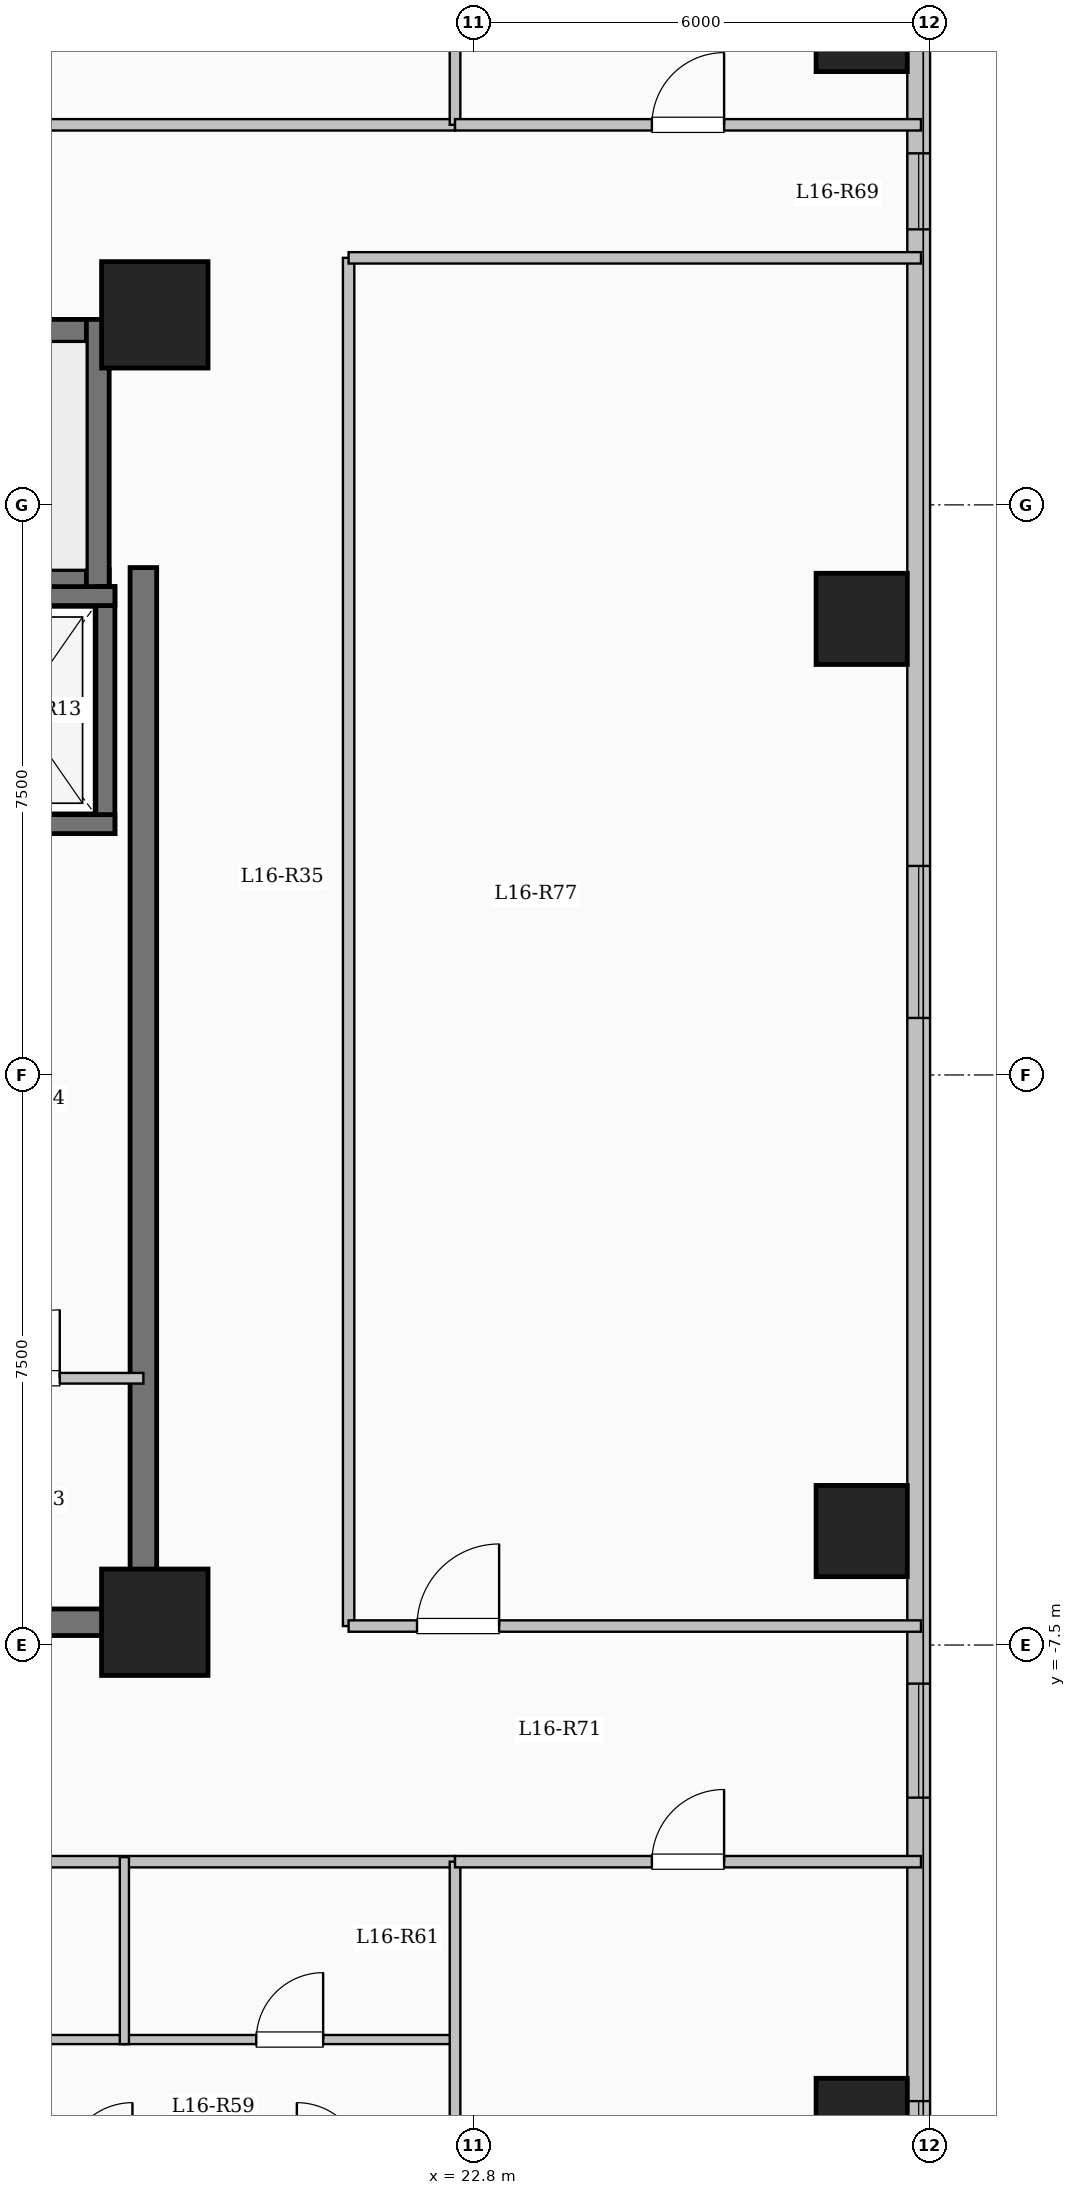
"""IFC4 building model, lengths in metres.
Left out: names, types, materials, properties, quantities, classifications, styles, units other than length and angle.
Written with IfcOpenShell. Run it as: python <this file> out.ifc"""

import sys

from ifc_helpers import new_model, si_unit, direction, frame, frame_2d, origin, origin_2d, place, context, subcontext, project, spatial, rectangle, extrude, element, fill, save


model = new_model("IFC4")
c1 = context("Model", 3, precision=1e-05, world=origin(), true_north=direction((0.0, 1.0)))
c2 = subcontext(c1, "Body", "Model", "MODEL_VIEW")
j1 = project(units=[si_unit("LENGTHUNIT", "METRE"), si_unit("PLANEANGLEUNIT", "RADIAN")], contexts=[c1])
p1 = place(None, origin())
s1 = spatial("IfcSite", under=j1, at=p1, CompositionType="ELEMENT")
p2 = place(p1, origin())
s2 = spatial("IfcBuilding", under=s1, at=p2, CompositionType="ELEMENT")
p3 = place(p2, frame((0.0, 0.0, 60.85)))
s3 = spatial("IfcBuildingStorey", under=s2, at=p3, CompositionType="ELEMENT", Elevation=60.85)
for number, where, z_axis, x_axis in (
    (1, (18.6, -7.2, 0.0), (0.0, 0.0, 1.0), (1.0, 0.0, 0.0)),
    (2, (18.6, 10.0, 0.0), (0.0, 0.0, 1.0), (1.0, 0.0, 0.0)),
):
    element("IfcColumn", number, at=place(p3, frame(where, z_axis=z_axis, x_axis=x_axis)), inside=s3, PredefinedType="COLUMN", context=c2, shape_type="SweptSolid", body=[
        extrude(rectangle(XDim=1.4, YDim=1.4, at=origin_2d()), origin(), (0.0, 0.0, 1.0), 3.35),
    ])
for number, where, z_axis, x_axis in (
    (3, (27.9, -13.8, 0.0), (0.0, 0.0, 1.0), (1.0, 0.0, 0.0)),
    (4, (27.9, -6.0, 0.0), (0.0, 0.0, 1.0), (1.0, 0.0, 0.0)),
    (5, (27.9, 6.0, 0.0), (0.0, 0.0, 1.0), (1.0, 0.0, 0.0)),
    (6, (27.9, 13.8, 0.0), (0.0, 0.0, 1.0), (1.0, 0.0, 0.0)),
):
    element("IfcColumn", number, at=place(p3, frame(where, z_axis=z_axis, x_axis=x_axis)), inside=s3, PredefinedType="COLUMN", context=c2, shape_type="SweptSolid", body=[
        extrude(rectangle(XDim=1.2, YDim=1.2, at=origin_2d()), origin(), (0.0, 0.0, 1.0), 3.35),
    ])
p4 = place(p3, frame((28.65, 19.05, 0.0), z_axis=(0.0, 0.0, 1.0), x_axis=(0.0, -1.0, 0.0)))
e7 = element("IfcWall", 7, at=p4, inside=s3, PredefinedType="SOLIDWALL", context=c2, shape_type="SweptSolid", body=[
    extrude(rectangle(XDim=38.1, YDim=0.3, at=frame_2d((19.05, 0.0))), origin(), (0.0, 0.0, 1.0), 3.05),
])
p5 = place(p4, frame((2.275, 0.0, 0.9)))
e8 = element("IfcOpeningElement", 8, at=p5, cuts=e7, PredefinedType="OPENING", context=c2, shape_type="SweptSolid", body=[
    extrude(rectangle(XDim=2.0, YDim=1.7, at=frame_2d((1.0, 0.85))), frame((0.0, 0.16, 0.0), z_axis=(0.0, -1.0, 0.0), x_axis=(1.0, 0.0, 0.0)), (0.0, 0.0, 1.0), 0.32),
])
p6 = place(p4, frame((6.925, 0.0, 0.95)))
e9 = element("IfcOpeningElement", 9, at=p6, cuts=e7, PredefinedType="OPENING", context=c2, shape_type="SweptSolid", body=[
    extrude(rectangle(XDim=1.0, YDim=1.5, at=frame_2d((0.5, 0.75))), frame((0.0, 0.16, 0.0), z_axis=(0.0, -1.0, 0.0), x_axis=(1.0, 0.0, 0.0)), (0.0, 0.0, 1.0), 0.32),
])
p7 = place(p4, frame((16.3, 0.0, 0.9)))
e10 = element("IfcOpeningElement", 10, at=p7, cuts=e7, PredefinedType="OPENING", context=c2, shape_type="SweptSolid", body=[
    extrude(rectangle(XDim=2.0, YDim=1.7, at=frame_2d((1.0, 0.85))), frame((0.0, 0.16, 0.0), z_axis=(0.0, -1.0, 0.0), x_axis=(1.0, 0.0, 0.0)), (0.0, 0.0, 1.0), 0.32),
])
p8 = place(p4, frame((27.058, 0.0, 0.9)))
e11 = element("IfcOpeningElement", 11, at=p8, cuts=e7, PredefinedType="OPENING", context=c2, shape_type="SweptSolid", body=[
    extrude(rectangle(XDim=1.5, YDim=1.65, at=frame_2d((0.75, 0.825))), frame((0.0, 0.16, 0.0), z_axis=(0.0, -1.0, 0.0), x_axis=(1.0, 0.0, 0.0)), (0.0, 0.0, 1.0), 0.32),
])
p9 = place(p4, frame((32.55, 0.0, 0.9)))
e12 = element("IfcOpeningElement", 12, at=p9, cuts=e7, PredefinedType="OPENING", context=c2, shape_type="SweptSolid", body=[
    extrude(rectangle(XDim=2.4, YDim=1.8, at=frame_2d((1.2, 0.9))), frame((0.0, 0.16, 0.0), z_axis=(0.0, -1.0, 0.0), x_axis=(1.0, 0.0, 0.0)), (0.0, 0.0, 1.0), 0.32),
])
p10 = place(p3, frame((10.0, 9.79, 0.0), z_axis=(0.0, 0.0, 1.0), x_axis=(1.0, 0.0, 0.0)))
e13 = element("IfcWall", 13, at=p10, inside=s3, PredefinedType="SHEAR", context=c2, shape_type="SweptSolid", body=[
    extrude(rectangle(XDim=8.0, YDim=0.3, at=frame_2d((4.0, 0.0))), origin(), (0.0, 0.0, 1.0), 3.35),
])
p11 = place(p3, frame((10.0, 6.5, 0.0), z_axis=(0.0, 0.0, 1.0), x_axis=(1.0, 0.0, 0.0)))
e14 = element("IfcWall", 14, at=p11, inside=s3, PredefinedType="SHEAR", context=c2, shape_type="SweptSolid", body=[
    extrude(rectangle(XDim=8.0, YDim=0.3, at=frame_2d((4.0, 0.0))), origin(), (0.0, 0.0, 1.0), 3.35),
])
p12 = place(p11, frame((0.55, 0.0, 0.0)))
e15 = element("IfcOpeningElement", 15, at=p12, cuts=e14, PredefinedType="OPENING", context=c2, shape_type="SweptSolid", body=[
    extrude(rectangle(XDim=1.0, YDim=2.15, at=frame_2d((0.5, 1.075))), frame((0.0, 0.16, 0.0), z_axis=(0.0, -1.0, 0.0), x_axis=(1.0, 0.0, 0.0)), (0.0, 0.0, 1.0), 0.32),
])
p13 = place(p3, frame((17.85, 6.35, 0.0), z_axis=(0.0, 0.0, 1.0), x_axis=(0.0, 1.0, 0.0)))
e16 = element("IfcWall", 16, at=p13, inside=s3, PredefinedType="SHEAR", context=c2, shape_type="SweptSolid", body=[
    extrude(rectangle(XDim=3.59, YDim=0.3, at=frame_2d((1.795, 0.0))), origin(), (0.0, 0.0, 1.0), 3.35),
])
p14 = place(p3, frame((17.95, 3.175, 0.0), z_axis=(0.0, 0.0, 1.0), x_axis=(0.0, 1.0, 0.0)))
e17 = element("IfcWall", 17, at=p14, inside=s3, PredefinedType="SHEAR", context=c2, shape_type="SweptSolid", body=[
    extrude(rectangle(XDim=3.25, YDim=0.25, at=frame_2d((1.625, 0.0))), origin(), (0.0, 0.0, 1.0), 3.35),
])
for number, where, z_axis, x_axis in (
    (18, (15.525, 3.3, 0.0), (0.0, 0.0, 1.0), (1.0, 0.0, 0.0)),
    (19, (15.525, 6.3, 0.0), (0.0, 0.0, 1.0), (1.0, 0.0, 0.0)),
):
    element("IfcWall", number, at=place(p3, frame(where, z_axis=z_axis, x_axis=x_axis)), inside=s3, PredefinedType="SHEAR", context=c2, shape_type="SweptSolid", body=[
        extrude(rectangle(XDim=2.55, YDim=0.25, at=frame_2d((1.275, 0.0))), origin(), (0.0, 0.0, 1.0), 3.35),
    ])
p15 = place(p3, frame((18.45, -7.375, 0.0), z_axis=(0.0, 0.0, 1.0), x_axis=(0.0, 1.0, 0.0)))
e20 = element("IfcWall", 20, at=p15, inside=s3, PredefinedType="SHEAR", context=c2, shape_type="SweptSolid", body=[
    extrude(rectangle(XDim=14.05, YDim=0.35, at=frame_2d((7.025, 0.0))), origin(), (0.0, 0.0, 1.0), 3.35),
])
p16 = place(p3, frame((10.075, -7.2, 0.0), z_axis=(0.0, 0.0, 1.0), x_axis=(1.0, 0.0, 0.0)))
e21 = element("IfcWall", 21, at=p16, inside=s3, PredefinedType="SHEAR", context=c2, shape_type="SweptSolid", body=[
    extrude(rectangle(XDim=8.55, YDim=0.35, at=frame_2d((4.275, 0.0))), origin(), (0.0, 0.0, 1.0), 3.35),
])
p17 = place(p3, frame((15.4, -3.99, 0.0), z_axis=(0.0, 0.0, 1.0), x_axis=(1.0, 0.0, 0.0)))
e22 = element("IfcWall", 22, at=p17, inside=s3, PredefinedType="PARTITIONING", context=c2, shape_type="SweptSolid", body=[
    extrude(rectangle(XDim=3.05, YDim=0.14, at=frame_2d((1.525, 0.0))), origin(), (0.0, 0.0, 1.0), 3.05),
])
p18 = place(p17, frame((1.05, 0.0, 0.0)))
e23 = element("IfcOpeningElement", 23, at=p18, cuts=e22, PredefinedType="OPENING", context=c2, shape_type="SweptSolid", body=[
    extrude(rectangle(XDim=0.9, YDim=2.08, at=frame_2d((0.45, 1.04))), frame((0.0, 0.08, 0.0), z_axis=(0.0, -1.0, 0.0), x_axis=(1.0, 0.0, 0.0)), (0.0, 0.0, 1.0), 0.16),
])
p19 = place(p3, frame((3.85, 12.5, 0.0), z_axis=(0.0, 0.0, 1.0), x_axis=(1.0, 0.0, 0.0)))
e24 = element("IfcWall", 24, at=p19, inside=s3, PredefinedType="PARTITIONING", context=c2, shape_type="SweptSolid", body=[
    extrude(rectangle(XDim=18.7, YDim=0.15, at=frame_2d((9.35, 0.0))), origin(), (0.0, 0.0, 1.0), 3.05),
])
p20 = place(p19, frame((0.7, 0.0, 0.0)))
e25 = element("IfcOpeningElement", 25, at=p20, cuts=e24, PredefinedType="OPENING", context=c2, shape_type="SweptSolid", body=[
    extrude(rectangle(XDim=0.96, YDim=2.15, at=frame_2d((0.48, 1.075))), frame((0.0, 0.085, 0.0), z_axis=(0.0, -1.0, 0.0), x_axis=(1.0, 0.0, 0.0)), (0.0, 0.0, 1.0), 0.17),
])
p21 = place(p3, frame((21.15, -7.25, 0.0), z_axis=(0.0, 0.0, 1.0), x_axis=(0.0, 1.0, 0.0)))
e26 = element("IfcWall", 26, at=p21, inside=s3, PredefinedType="PARTITIONING", context=c2, shape_type="SweptSolid", body=[
    extrude(rectangle(XDim=18.0, YDim=0.15, at=frame_2d((9.0, 0.0))), origin(), (0.0, 0.0, 1.0), 2.535),
])
p22 = place(p3, frame((8.55, -10.35, 0.0), z_axis=(0.0, 0.0, 1.0), x_axis=(1.0, 0.0, 0.0)))
e27 = element("IfcWall", 27, at=p22, inside=s3, PredefinedType="PARTITIONING", context=c2, shape_type="SweptSolid", body=[
    extrude(rectangle(XDim=14.0, YDim=0.15, at=frame_2d((7.0, 0.0))), origin(), (0.0, 0.0, 1.0), 3.05),
])
p23 = place(p22, frame((0.75, 0.0, 0.0)))
e28 = element("IfcOpeningElement", 28, at=p23, cuts=e27, PredefinedType="OPENING", context=c2, shape_type="SweptSolid", body=[
    extrude(rectangle(XDim=0.96, YDim=2.15, at=frame_2d((0.48, 1.075))), frame((0.0, 0.085, 0.0), z_axis=(0.0, -1.0, 0.0), x_axis=(1.0, 0.0, 0.0)), (0.0, 0.0, 1.0), 0.17),
])
p24 = place(p3, frame((13.362, -12.69, 0.0), z_axis=(0.0, 0.0, 1.0), x_axis=(1.0, 0.0, 0.0)))
e29 = element("IfcWall", 29, at=p24, inside=s3, PredefinedType="PARTITIONING", context=c2, shape_type="SweptSolid", body=[
    extrude(rectangle(XDim=4.838, YDim=0.12, at=frame_2d((2.419, 0.0))), origin(), (0.0, 0.0, 1.0), 2.535),
])
p25 = place(p24, frame((1.979, 0.0, 0.0)))
e30 = element("IfcOpeningElement", 30, at=p25, cuts=e29, PredefinedType="OPENING", context=c2, shape_type="SweptSolid", body=[
    extrude(rectangle(XDim=0.88, YDim=2.1, at=frame_2d((0.44, 1.05))), frame((0.0, 0.07, 0.0), z_axis=(0.0, -1.0, 0.0), x_axis=(1.0, 0.0, 0.0)), (0.0, 0.0, 1.0), 0.14),
])
p26 = place(p3, frame((18.2, -12.69, 0.0), z_axis=(0.0, 0.0, 1.0), x_axis=(1.0, 0.0, 0.0)))
e31 = element("IfcWall", 31, at=p26, inside=s3, PredefinedType="PARTITIONING", context=c2, shape_type="SweptSolid", body=[
    extrude(rectangle(XDim=4.35, YDim=0.12, at=frame_2d((2.175, 0.0))), origin(), (0.0, 0.0, 1.0), 3.05),
])
p27 = place(p26, frame((1.735, 0.0, 0.0)))
e32 = element("IfcOpeningElement", 32, at=p27, cuts=e31, PredefinedType="OPENING", context=c2, shape_type="SweptSolid", body=[
    extrude(rectangle(XDim=0.88, YDim=2.1, at=frame_2d((0.44, 1.05))), frame((0.0, 0.07, 0.0), z_axis=(0.0, -1.0, 0.0), x_axis=(1.0, 0.0, 0.0)), (0.0, 0.0, 1.0), 0.14),
])
p28 = place(p3, frame((18.2, -12.75, 0.0), z_axis=(0.0, 0.0, 1.0), x_axis=(0.0, 1.0, 0.0)))
e33 = element("IfcWall", 33, at=p28, inside=s3, PredefinedType="PARTITIONING", context=c2, shape_type="SweptSolid", body=[
    extrude(rectangle(XDim=2.46, YDim=0.12, at=frame_2d((1.23, 0.0))), origin(), (0.0, 0.0, 1.0), 3.05),
])
p29 = place(p3, frame((21.15, -7.25, 0.0), z_axis=(0.0, 0.0, 1.0), x_axis=(1.0, 0.0, 0.0)))
e34 = element("IfcWall", 34, at=p29, inside=s3, PredefinedType="PARTITIONING", context=c2, shape_type="SweptSolid", body=[
    extrude(rectangle(XDim=7.53, YDim=0.15, at=frame_2d((3.765, 0.0))), origin(), (0.0, 0.0, 1.0), 3.05),
])
p30 = place(p29, frame((0.9, 0.0, 0.0)))
e35 = element("IfcOpeningElement", 35, at=p30, cuts=e34, PredefinedType="OPENING", context=c2, shape_type="SweptSolid", body=[
    extrude(rectangle(XDim=1.08, YDim=2.15, at=frame_2d((0.54, 1.075))), frame((0.0, 0.085, 0.0), z_axis=(0.0, -1.0, 0.0), x_axis=(1.0, 0.0, 0.0)), (0.0, 0.0, 1.0), 0.17),
])
p31 = place(p3, frame((21.15, 10.75, 0.0), z_axis=(0.0, 0.0, 1.0), x_axis=(1.0, 0.0, 0.0)))
e36 = element("IfcWall", 36, at=p31, inside=s3, PredefinedType="PARTITIONING", context=c2, shape_type="SweptSolid", body=[
    extrude(rectangle(XDim=7.53, YDim=0.15, at=frame_2d((3.765, 0.0))), origin(), (0.0, 0.0, 1.0), 3.05),
])
p32 = place(p3, frame((22.55, -19.05, 0.0), z_axis=(0.0, 0.0, 1.0), x_axis=(0.0, 1.0, 0.0)))
e37 = element("IfcWall", 37, at=p32, inside=s3, PredefinedType="PARTITIONING", context=c2, shape_type="SweptSolid", body=[
    extrude(rectangle(XDim=8.7, YDim=0.14, at=frame_2d((4.35, 0.0))), origin(), (0.0, 0.0, 1.0), 3.05),
])
p33 = place(p3, frame((22.55, 12.5, 0.0), z_axis=(0.0, 0.0, 1.0), x_axis=(0.0, 1.0, 0.0)))
e38 = element("IfcWall", 38, at=p33, inside=s3, PredefinedType="PARTITIONING", context=c2, shape_type="SweptSolid", body=[
    extrude(rectangle(XDim=6.55, YDim=0.14, at=frame_2d((3.275, 0.0))), origin(), (0.0, 0.0, 1.0), 3.05),
])
p34 = place(p3, frame((22.55, 12.5, 0.0), z_axis=(0.0, 0.0, 1.0), x_axis=(1.0, 0.0, 0.0)))
e39 = element("IfcWall", 39, at=p34, inside=s3, PredefinedType="PARTITIONING", context=c2, shape_type="SweptSolid", body=[
    extrude(rectangle(XDim=6.13, YDim=0.15, at=frame_2d((3.065, 0.0))), origin(), (0.0, 0.0, 1.0), 3.05),
])
p35 = place(p34, frame((2.59, 0.0, 0.0)))
e40 = element("IfcOpeningElement", 40, at=p35, cuts=e39, PredefinedType="OPENING", context=c2, shape_type="SweptSolid", body=[
    extrude(rectangle(XDim=0.95, YDim=2.15, at=frame_2d((0.475, 1.075))), frame((0.0, 0.085, 0.0), z_axis=(0.0, -1.0, 0.0), x_axis=(1.0, 0.0, 0.0)), (0.0, 0.0, 1.0), 0.17),
])
p36 = place(p3, frame((22.55, -10.35, 0.0), z_axis=(0.0, 0.0, 1.0), x_axis=(1.0, 0.0, 0.0)))
e41 = element("IfcWall", 41, at=p36, inside=s3, PredefinedType="PARTITIONING", context=c2, shape_type="SweptSolid", body=[
    extrude(rectangle(XDim=6.13, YDim=0.15, at=frame_2d((3.065, 0.0))), origin(), (0.0, 0.0, 1.0), 3.05),
])
p37 = place(p36, frame((2.59, 0.0, 0.0)))
e42 = element("IfcOpeningElement", 42, at=p37, cuts=e41, PredefinedType="OPENING", context=c2, shape_type="SweptSolid", body=[
    extrude(rectangle(XDim=0.95, YDim=2.15, at=frame_2d((0.475, 1.075))), frame((0.0, 0.085, 0.0), z_axis=(0.0, -1.0, 0.0), x_axis=(1.0, 0.0, 0.0)), (0.0, 0.0, 1.0), 0.17),
])
p38 = place(p6, origin())
e43 = element("IfcWindow", 43, at=p38, inside=s3, PartitioningType="SINGLE_PANEL", PredefinedType="WINDOW", context=c2, shape_type="SweptSolid", body=[
    extrude(rectangle(XDim=1.0, YDim=1.5, at=frame_2d((0.5, 0.75))), frame((0.0, 0.03, 0.0), z_axis=(0.0, -1.0, 0.0), x_axis=(1.0, 0.0, 0.0)), (0.0, 0.0, 1.0), 0.06),
])
fill(e9, e43)
p39 = place(p7, origin())
e44 = element("IfcWindow", 44, at=p39, inside=s3, PartitioningType="SINGLE_PANEL", PredefinedType="WINDOW", context=c2, shape_type="SweptSolid", body=[
    extrude(rectangle(XDim=2.0, YDim=1.7, at=frame_2d((1.0, 0.85))), frame((0.0, 0.03, 0.0), z_axis=(0.0, -1.0, 0.0), x_axis=(1.0, 0.0, 0.0)), (0.0, 0.0, 1.0), 0.06),
])
fill(e10, e44)
p40 = place(p8, origin())
e45 = element("IfcWindow", 45, at=p40, inside=s3, PartitioningType="SINGLE_PANEL", PredefinedType="WINDOW", context=c2, shape_type="SweptSolid", body=[
    extrude(rectangle(XDim=1.5, YDim=1.65, at=frame_2d((0.75, 0.825))), frame((0.0, 0.03, 0.0), z_axis=(0.0, -1.0, 0.0), x_axis=(1.0, 0.0, 0.0)), (0.0, 0.0, 1.0), 0.06),
])
fill(e11, e45)
p41 = place(p9, origin())
e46 = element("IfcWindow", 46, at=p41, inside=s3, PartitioningType="SINGLE_PANEL", PredefinedType="WINDOW", context=c2, shape_type="SweptSolid", body=[
    extrude(rectangle(XDim=2.4, YDim=1.8, at=frame_2d((1.2, 0.9))), frame((0.0, 0.03, 0.0), z_axis=(0.0, -1.0, 0.0), x_axis=(1.0, 0.0, 0.0)), (0.0, 0.0, 1.0), 0.06),
])
fill(e12, e46)
p42 = place(p18, origin())
e47 = element("IfcDoor", 47, at=p42, inside=s3, OperationType="SINGLE_SWING_RIGHT", PredefinedType="DOOR", context=c2, shape_type="SweptSolid", body=[
    extrude(rectangle(XDim=0.9, YDim=2.08, at=frame_2d((0.45, 1.04))), frame((0.0, 0.025, 0.0), z_axis=(0.0, -1.0, 0.0), x_axis=(1.0, 0.0, 0.0)), (0.0, 0.0, 1.0), 0.05),
])
fill(e23, e47)
p43 = place(p27, origin())
e48 = element("IfcDoor", 48, at=p43, inside=s3, OperationType="SINGLE_SWING_RIGHT", PredefinedType="DOOR", context=c2, shape_type="SweptSolid", body=[
    extrude(rectangle(XDim=0.88, YDim=2.1, at=frame_2d((0.44, 1.05))), frame((0.0, 0.025, 0.0), z_axis=(0.0, -1.0, 0.0), x_axis=(1.0, 0.0, 0.0)), (0.0, 0.0, 1.0), 0.05),
])
fill(e32, e48)
p44 = place(p35, origin())
e49 = element("IfcDoor", 49, at=p44, inside=s3, OperationType="SINGLE_SWING_RIGHT", PredefinedType="DOOR", context=c2, shape_type="SweptSolid", body=[
    extrude(rectangle(XDim=0.95, YDim=2.15, at=frame_2d((0.475, 1.075))), frame((0.0, 0.025, 0.0), z_axis=(0.0, -1.0, 0.0), x_axis=(1.0, 0.0, 0.0)), (0.0, 0.0, 1.0), 0.05),
])
fill(e40, e49)
p45 = place(p37, origin())
e50 = element("IfcDoor", 50, at=p45, inside=s3, OperationType="SINGLE_SWING_RIGHT", PredefinedType="DOOR", context=c2, shape_type="SweptSolid", body=[
    extrude(rectangle(XDim=0.95, YDim=2.15, at=frame_2d((0.475, 1.075))), frame((0.0, 0.025, 0.0), z_axis=(0.0, -1.0, 0.0), x_axis=(1.0, 0.0, 0.0)), (0.0, 0.0, 1.0), 0.05),
])
fill(e42, e50)
p46 = place(p30, origin())
e51 = element("IfcDoor", 51, at=p46, inside=s3, OperationType="SINGLE_SWING_RIGHT", PredefinedType="DOOR", context=c2, shape_type="SweptSolid", body=[
    extrude(rectangle(XDim=1.08, YDim=2.15, at=frame_2d((0.54, 1.075))), frame((0.0, 0.025, 0.0), z_axis=(0.0, -1.0, 0.0), x_axis=(1.0, 0.0, 0.0)), (0.0, 0.0, 1.0), 0.05),
])
fill(e35, e51)
save(model, sys.argv[1])
